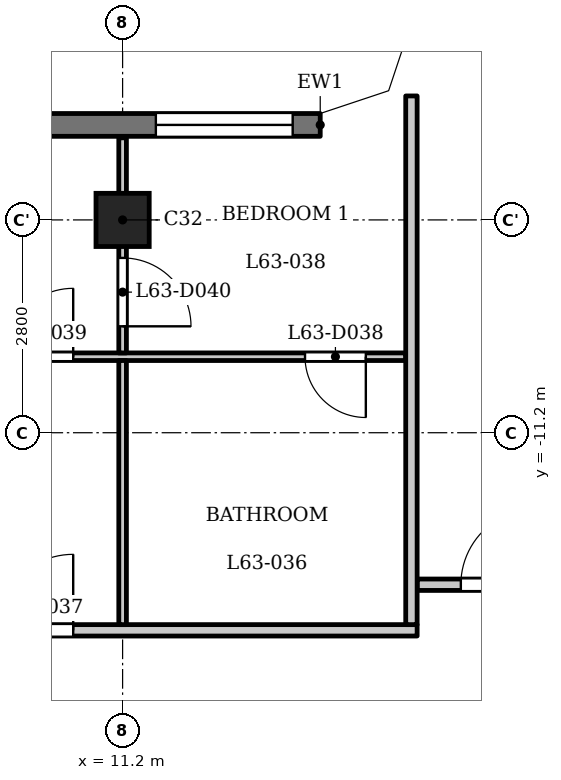
"""IFC4 building model, lengths in metres.
Left out: names, types, materials, properties, quantities, classifications, styles, units other than length and angle.
Written with IfcOpenShell. Run it as: python <this file> out.ifc"""

import sys

from ifc_helpers import new_model, si_unit, direction, frame, frame_2d, origin, origin_2d, place, context, subcontext, project, spatial, polyline, rectangle, outline, extrude, element, fill, save


model = new_model("IFC4")
c1 = context("Model", 3, precision=1e-05, world=origin(), true_north=direction((0.0, 1.0)))
c2 = subcontext(c1, "Body", "Model", "MODEL_VIEW")
j1 = project(units=[si_unit("LENGTHUNIT", "METRE"), si_unit("PLANEANGLEUNIT", "RADIAN")], contexts=[c1])
p1 = place(None, origin())
s1 = spatial("IfcSite", under=j1, at=p1, CompositionType="ELEMENT")
p2 = place(p1, origin())
s2 = spatial("IfcBuilding", under=s1, at=p2, CompositionType="ELEMENT")
p3 = place(p2, frame((0.0, 0.0, 245.2)))
s3 = spatial("IfcBuildingStorey", under=s2, at=p3, CompositionType="ELEMENT", Elevation=245.2)
p4 = place(p3, frame((11.2, -8.4, 0.0), z_axis=(0.0, 0.0, 1.0), x_axis=(1.0, 0.0, 0.0)))
e1 = element("IfcColumn", 1, at=p4, inside=s3, PredefinedType="COLUMN", context=c2, shape_type="SweptSolid", body=[
    extrude(rectangle(XDim=0.7, YDim=0.7, at=origin_2d()), origin(), (0.0, 0.0, 1.0), 3.5),
])
p5 = place(p3, frame((13.8, -7.15, 0.0), z_axis=(0.0, 0.0, 1.0), x_axis=(-1.0, 0.0, 0.0)))
e2 = element("IfcWall", 2, at=p5, inside=s3, PredefinedType="SOLIDWALL", context=c2, shape_type="SweptSolid", body=[
    extrude(rectangle(XDim=27.6, YDim=0.3, at=frame_2d((13.8, 0.0))), origin(), (0.0, 0.0, 1.0), 3.2),
])
p6 = place(p5, frame((0.363, 0.0, 0.9)))
e3 = element("IfcOpeningElement", 3, at=p6, cuts=e2, PredefinedType="OPENING", context=c2, shape_type="SweptSolid", body=[
    extrude(rectangle(XDim=1.8, YDim=1.25, at=frame_2d((0.9, 0.625))), frame((0.0, 0.16, 0.0), z_axis=(0.0, -1.0, 0.0), x_axis=(1.0, 0.0, 0.0)), (0.0, 0.0, 1.0), 0.32),
])
p7 = place(p5, frame((3.6, 0.0, 1.2)))
e4 = element("IfcOpeningElement", 4, at=p7, cuts=e2, PredefinedType="OPENING", context=c2, shape_type="SweptSolid", body=[
    extrude(rectangle(XDim=3.6, YDim=0.95, at=frame_2d((1.8, 0.475))), frame((0.0, 0.16, 0.0), z_axis=(0.0, -1.0, 0.0), x_axis=(1.0, 0.0, 0.0)), (0.0, 0.0, 1.0), 0.32),
])
p8 = place(p5, frame((9.2, 0.0, 1.2)))
e5 = element("IfcOpeningElement", 5, at=p8, cuts=e2, PredefinedType="OPENING", context=c2, shape_type="SweptSolid", body=[
    extrude(rectangle(XDim=3.6, YDim=0.95, at=frame_2d((1.8, 0.475))), frame((0.0, 0.16, 0.0), z_axis=(0.0, -1.0, 0.0), x_axis=(1.0, 0.0, 0.0)), (0.0, 0.0, 1.0), 0.32),
])
p9 = place(p5, frame((14.8, 0.0, 1.2)))
e6 = element("IfcOpeningElement", 6, at=p9, cuts=e2, PredefinedType="OPENING", context=c2, shape_type="SweptSolid", body=[
    extrude(rectangle(XDim=3.6, YDim=0.95, at=frame_2d((1.8, 0.475))), frame((0.0, 0.16, 0.0), z_axis=(0.0, -1.0, 0.0), x_axis=(1.0, 0.0, 0.0)), (0.0, 0.0, 1.0), 0.32),
])
p10 = place(p5, frame((20.4, 0.0, 1.2)))
e7 = element("IfcOpeningElement", 7, at=p10, cuts=e2, PredefinedType="OPENING", context=c2, shape_type="SweptSolid", body=[
    extrude(rectangle(XDim=3.6, YDim=0.95, at=frame_2d((1.8, 0.475))), frame((0.0, 0.16, 0.0), z_axis=(0.0, -1.0, 0.0), x_axis=(1.0, 0.0, 0.0)), (0.0, 0.0, 1.0), 0.32),
])
p11 = place(p5, frame((25.438, 0.0, 0.9)))
e8 = element("IfcOpeningElement", 8, at=p11, cuts=e2, PredefinedType="OPENING", context=c2, shape_type="SweptSolid", body=[
    extrude(rectangle(XDim=1.8, YDim=1.25, at=frame_2d((0.9, 0.625))), frame((0.0, 0.16, 0.0), z_axis=(0.0, -1.0, 0.0), x_axis=(1.0, 0.0, 0.0)), (0.0, 0.0, 1.0), 0.32),
])
p12 = place(p3, frame((-15.075, -13.8, 0.0), z_axis=(0.0, 0.0, 1.0), x_axis=(1.0, 0.0, 0.0)))
e9 = element("IfcWall", 9, at=p12, inside=s3, PredefinedType="PARTITIONING", context=c2, shape_type="SweptSolid", body=[
    extrude(rectangle(XDim=30.15, YDim=0.15, at=frame_2d((15.075, 0.0))), origin(), (0.0, 0.0, 1.0), 3.2),
])
p13 = place(p12, frame((2.225, 0.0, 0.0)))
e10 = element("IfcOpeningElement", 10, at=p13, cuts=e9, PredefinedType="OPENING", context=c2, shape_type="SweptSolid", body=[
    extrude(rectangle(XDim=1.0, YDim=2.1, at=frame_2d((0.5, 1.05))), frame((0.0, 0.085, 0.0), z_axis=(0.0, -1.0, 0.0), x_axis=(1.0, 0.0, 0.0)), (0.0, 0.0, 1.0), 0.17),
])
p14 = place(p12, frame((13.425, 0.0, 0.0)))
e11 = element("IfcOpeningElement", 11, at=p14, cuts=e9, PredefinedType="OPENING", context=c2, shape_type="SweptSolid", body=[
    extrude(rectangle(XDim=1.0, YDim=2.1, at=frame_2d((0.5, 1.05))), frame((0.0, 0.085, 0.0), z_axis=(0.0, -1.0, 0.0), x_axis=(1.0, 0.0, 0.0)), (0.0, 0.0, 1.0), 0.17),
])
p15 = place(p12, frame((24.625, 0.0, 0.0)))
e12 = element("IfcOpeningElement", 12, at=p15, cuts=e9, PredefinedType="OPENING", context=c2, shape_type="SweptSolid", body=[
    extrude(rectangle(XDim=1.0, YDim=2.1, at=frame_2d((0.5, 1.05))), frame((0.0, 0.085, 0.0), z_axis=(0.0, -1.0, 0.0), x_axis=(1.0, 0.0, 0.0)), (0.0, 0.0, 1.0), 0.17),
])
p16 = place(p3, frame((15.075, -13.2, 0.0), z_axis=(0.0, 0.0, 1.0), x_axis=(1.0, 0.0, 0.0)))
e13 = element("IfcWall", 13, at=p16, inside=s3, PredefinedType="PARTITIONING", context=c2, shape_type="SweptSolid", body=[
    extrude(rectangle(XDim=2.325, YDim=0.15, at=frame_2d((1.163, 0.0))), origin(), (0.0, 0.0, 1.0), 3.2),
])
p17 = place(p16, frame((0.575, 0.0, 0.0)))
e14 = element("IfcOpeningElement", 14, at=p17, cuts=e13, PredefinedType="OPENING", context=c2, shape_type="SweptSolid", body=[
    extrude(rectangle(XDim=1.0, YDim=2.1, at=frame_2d((0.5, 1.05))), frame((0.0, 0.085, 0.0), z_axis=(0.0, -1.0, 0.0), x_axis=(1.0, 0.0, 0.0)), (0.0, 0.0, 1.0), 0.17),
])
p18 = place(p3, frame((-14.925, -10.2, 0.0), z_axis=(0.0, 0.0, 1.0), x_axis=(1.0, 0.0, 0.0)))
e15 = element("IfcWall", 15, at=p18, inside=s3, PredefinedType="PARTITIONING", context=c2, shape_type="SweptSolid", body=[
    extrude(rectangle(XDim=29.85, YDim=0.1, at=frame_2d((14.925, 0.0))), origin(), (0.0, 0.0, 1.0), 3.2),
])
p19 = place(p18, frame((7.875, 0.0, 0.0)))
e16 = element("IfcOpeningElement", 16, at=p19, cuts=e15, PredefinedType="OPENING", context=c2, shape_type="SweptSolid", body=[
    extrude(rectangle(XDim=0.8, YDim=2.1, at=frame_2d((0.4, 1.05))), frame((0.0, 0.06, 0.0), z_axis=(0.0, -1.0, 0.0), x_axis=(1.0, 0.0, 0.0)), (0.0, 0.0, 1.0), 0.12),
])
p20 = place(p18, frame((2.175, 0.0, 0.0)))
e17 = element("IfcOpeningElement", 17, at=p20, cuts=e15, PredefinedType="OPENING", context=c2, shape_type="SweptSolid", body=[
    extrude(rectangle(XDim=0.9, YDim=2.1, at=frame_2d((0.45, 1.05))), frame((0.0, 0.06, 0.0), z_axis=(0.0, -1.0, 0.0), x_axis=(1.0, 0.0, 0.0)), (0.0, 0.0, 1.0), 0.12),
])
p21 = place(p18, frame((19.075, 0.0, 0.0)))
e18 = element("IfcOpeningElement", 18, at=p21, cuts=e15, PredefinedType="OPENING", context=c2, shape_type="SweptSolid", body=[
    extrude(rectangle(XDim=0.8, YDim=2.1, at=frame_2d((0.4, 1.05))), frame((0.0, 0.06, 0.0), z_axis=(0.0, -1.0, 0.0), x_axis=(1.0, 0.0, 0.0)), (0.0, 0.0, 1.0), 0.12),
])
p22 = place(p18, frame((13.375, 0.0, 0.0)))
e19 = element("IfcOpeningElement", 19, at=p22, cuts=e15, PredefinedType="OPENING", context=c2, shape_type="SweptSolid", body=[
    extrude(rectangle(XDim=0.9, YDim=2.1, at=frame_2d((0.45, 1.05))), frame((0.0, 0.06, 0.0), z_axis=(0.0, -1.0, 0.0), x_axis=(1.0, 0.0, 0.0)), (0.0, 0.0, 1.0), 0.12),
])
p23 = place(p18, frame((28.525, 0.0, 0.0)))
e20 = element("IfcOpeningElement", 20, at=p23, cuts=e15, PredefinedType="OPENING", context=c2, shape_type="SweptSolid", body=[
    extrude(rectangle(XDim=0.8, YDim=2.1, at=frame_2d((0.4, 1.05))), frame((0.0, 0.06, 0.0), z_axis=(0.0, -1.0, 0.0), x_axis=(1.0, 0.0, 0.0)), (0.0, 0.0, 1.0), 0.12),
])
p24 = place(p18, frame((24.575, 0.0, 0.0)))
e21 = element("IfcOpeningElement", 21, at=p24, cuts=e15, PredefinedType="OPENING", context=c2, shape_type="SweptSolid", body=[
    extrude(rectangle(XDim=0.9, YDim=2.1, at=frame_2d((0.45, 1.05))), frame((0.0, 0.06, 0.0), z_axis=(0.0, -1.0, 0.0), x_axis=(1.0, 0.0, 0.0)), (0.0, 0.0, 1.0), 0.12),
])
p25 = place(p3, frame((11.2, -13.725, 0.0), z_axis=(0.0, 0.0, 1.0), x_axis=(0.0, 1.0, 0.0)))
e22 = element("IfcWall", 22, at=p25, inside=s3, PredefinedType="PARTITIONING", context=c2, shape_type="SweptSolid", body=[
    extrude(rectangle(XDim=3.475, YDim=0.1, at=frame_2d((1.738, 0.0))), origin(), (0.0, 0.0, 1.0), 3.2),
])
p26 = place(p3, frame((11.2, -10.15, 0.0), z_axis=(0.0, 0.0, 1.0), x_axis=(0.0, 1.0, 0.0)))
e23 = element("IfcWall", 23, at=p26, inside=s3, PredefinedType="PARTITIONING", context=c2, shape_type="SweptSolid", body=[
    extrude(rectangle(XDim=2.83, YDim=0.1, at=frame_2d((1.415, 0.0))), origin(), (0.0, 0.0, 1.0), 3.2),
])
p27 = place(p26, frame((0.35, 0.0, 0.0)))
e24 = element("IfcOpeningElement", 24, at=p27, cuts=e23, PredefinedType="OPENING", context=c2, shape_type="SweptSolid", body=[
    extrude(rectangle(XDim=0.9, YDim=2.1, at=frame_2d((0.45, 1.05))), frame((0.0, 0.06, 0.0), z_axis=(0.0, -1.0, 0.0), x_axis=(1.0, 0.0, 0.0)), (0.0, 0.0, 1.0), 0.12),
])
p28 = place(p3, frame((15.0, -13.725, 0.0), z_axis=(0.0, 0.0, 1.0), x_axis=(0.0, 1.0, 0.0)))
e25 = element("IfcWall", 25, at=p28, inside=s3, PredefinedType="PARTITIONING", context=c2, shape_type="SweptSolid", body=[
    extrude(rectangle(XDim=6.956, YDim=0.15, at=frame_2d((3.478, 0.0))), origin(), (0.0, 0.0, 1.0), 3.2),
])
p29 = place(p3, origin())
e26 = element("IfcWall", 26, at=p29, inside=s3, PredefinedType="SOLIDWALL", context=c2, shape_type="SweptSolid", body=[
    extrude(outline(polyline([(14.937, -6.937), (15.3, -5.849), (15.3, -5.8), (15.0, -5.8), (14.7, -6.7), (13.8, -7.0), (13.8, -7.3), (13.849, -7.3), (14.937, -6.937)])), origin(), (0.0, 0.0, 1.0), 3.2),
])
p30 = place(p17, origin())
e27 = element("IfcDoor", 27, at=p30, inside=s3, OperationType="SINGLE_SWING_LEFT", PredefinedType="DOOR", context=c2, shape_type="SweptSolid", body=[
    extrude(rectangle(XDim=1.0, YDim=2.1, at=frame_2d((0.5, 1.05))), frame((0.0, 0.025, 0.0), z_axis=(0.0, -1.0, 0.0), x_axis=(1.0, 0.0, 0.0)), (0.0, 0.0, 1.0), 0.05),
])
fill(e14, e27)
p31 = place(p15, origin())
e28 = element("IfcDoor", 28, at=p31, inside=s3, OperationType="SINGLE_SWING_LEFT", PredefinedType="DOOR", context=c2, shape_type="SweptSolid", body=[
    extrude(rectangle(XDim=1.0, YDim=2.1, at=frame_2d((0.5, 1.05))), frame((0.0, 0.025, 0.0), z_axis=(0.0, -1.0, 0.0), x_axis=(1.0, 0.0, 0.0)), (0.0, 0.0, 1.0), 0.05),
])
fill(e12, e28)
p32 = place(p23, origin())
e29 = element("IfcDoor", 29, at=p32, inside=s3, OperationType="SINGLE_SWING_RIGHT", PredefinedType="DOOR", context=c2, shape_type="SweptSolid", body=[
    extrude(rectangle(XDim=0.8, YDim=2.1, at=frame_2d((0.4, 1.05))), frame((0.0, 0.025, 0.0), z_axis=(0.0, -1.0, 0.0), x_axis=(1.0, 0.0, 0.0)), (0.0, 0.0, 1.0), 0.05),
])
fill(e20, e29)
p33 = place(p24, origin())
e30 = element("IfcDoor", 30, at=p33, inside=s3, OperationType="SINGLE_SWING_LEFT", PredefinedType="DOOR", context=c2, shape_type="SweptSolid", body=[
    extrude(rectangle(XDim=0.9, YDim=2.1, at=frame_2d((0.45, 1.05))), frame((0.0, 0.025, 0.0), z_axis=(0.0, -1.0, 0.0), x_axis=(1.0, 0.0, 0.0)), (0.0, 0.0, 1.0), 0.05),
])
fill(e21, e30)
p34 = place(p27, origin())
e31 = element("IfcDoor", 31, at=p34, inside=s3, OperationType="SINGLE_SWING_LEFT", PredefinedType="DOOR", context=c2, shape_type="SweptSolid", body=[
    extrude(rectangle(XDim=0.9, YDim=2.1, at=frame_2d((0.45, 1.05))), frame((0.0, 0.025, 0.0), z_axis=(0.0, -1.0, 0.0), x_axis=(1.0, 0.0, 0.0)), (0.0, 0.0, 1.0), 0.05),
])
fill(e24, e31)
p35 = place(p6, origin())
e32 = element("IfcWindow", 32, at=p35, inside=s3, PartitioningType="SINGLE_PANEL", PredefinedType="WINDOW", context=c2, shape_type="SweptSolid", body=[
    extrude(rectangle(XDim=1.8, YDim=1.25, at=frame_2d((0.9, 0.625))), frame((0.0, 0.03, 0.0), z_axis=(0.0, -1.0, 0.0), x_axis=(1.0, 0.0, 0.0)), (0.0, 0.0, 1.0), 0.06),
])
fill(e3, e32)
save(model, sys.argv[1])
